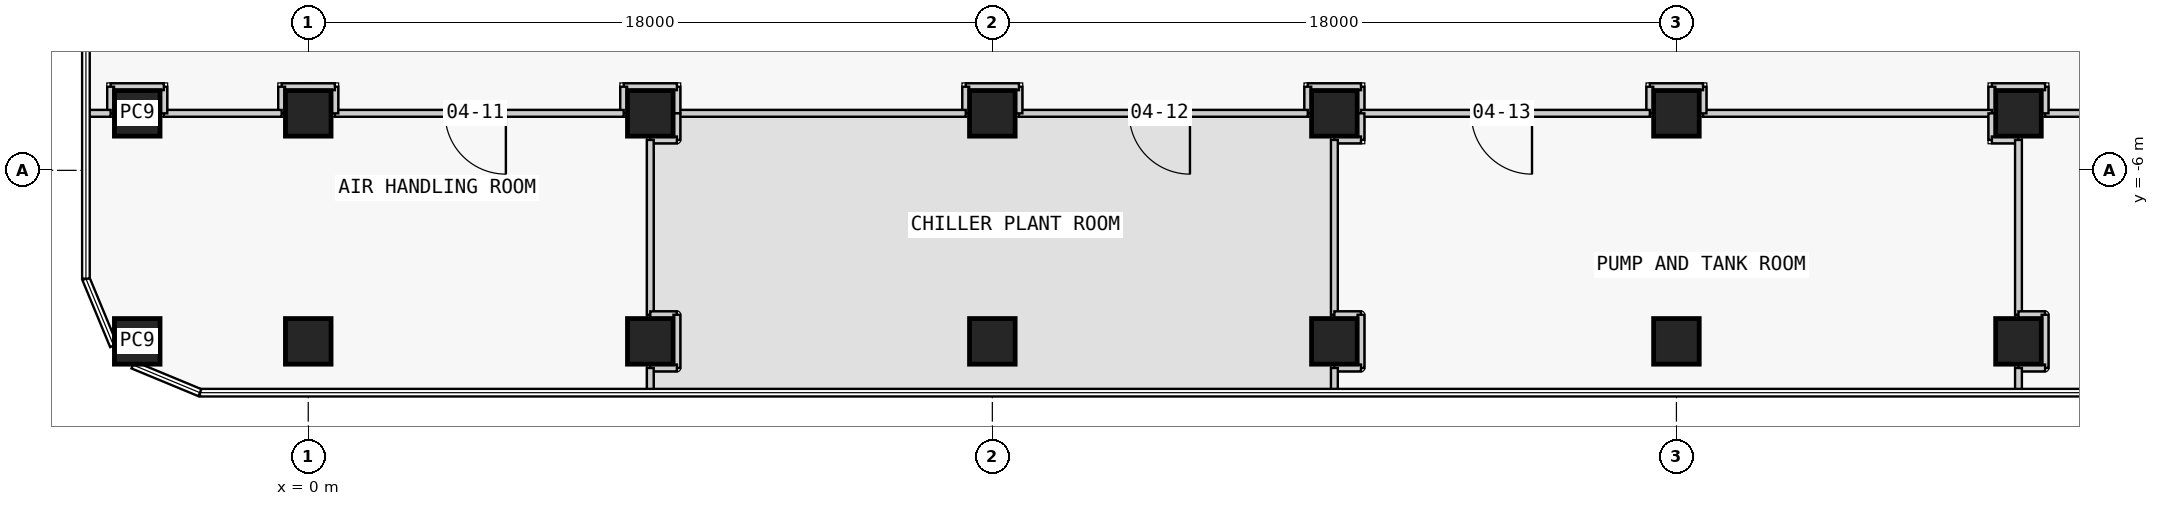
"""IFC4 building model, lengths in metres.
Left out: names, types, materials, properties, quantities, classifications, styles, units other than length and angle.
Written with IfcOpenShell. Run it as: python <this file> out.ifc"""

import sys

from ifc_helpers import new_model, si_unit, direction, frame, frame_2d, origin, origin_2d, place, context, subcontext, project, spatial, rectangle, extrude, element, fill, save


model = new_model("IFC4")
c1 = context("Model", 3, precision=1e-05, world=origin(), true_north=direction((0.0, 1.0)))
c2 = subcontext(c1, "Body", "Model", "MODEL_VIEW")
j1 = project(units=[si_unit("LENGTHUNIT", "METRE"), si_unit("PLANEANGLEUNIT", "RADIAN")], contexts=[c1])
p1 = place(None, origin())
s1 = spatial("IfcSite", under=j1, at=p1, CompositionType="ELEMENT")
p2 = place(p1, origin())
s2 = spatial("IfcBuilding", under=s1, at=p2, CompositionType="ELEMENT")
p3 = place(p2, frame((0.0, 0.0, 21.8)))
s3 = spatial("IfcBuildingStorey", under=s2, at=p3, CompositionType="ELEMENT", Elevation=21.8)
for number, where, z_axis, x_axis in (
    (1, (-4.5, -10.5, 0.0), (0.0, 0.0, 1.0), (1.0, 0.0, 0.0)),
    (2, (-4.5, -4.5, 0.0), (0.0, 0.0, 1.0), (1.0, 0.0, 0.0)),
    (3, (0.0, -10.5, 0.0), (0.0, 0.0, 1.0), (1.0, 0.0, 0.0)),
    (4, (0.0, -4.5, 0.0), (0.0, 0.0, 1.0), (1.0, 0.0, 0.0)),
    (5, (9.0, -10.5, 0.0), (0.0, 0.0, 1.0), (1.0, 0.0, 0.0)),
    (6, (9.0, -4.5, 0.0), (0.0, 0.0, 1.0), (1.0, 0.0, 0.0)),
    (7, (18.0, -10.5, 0.0), (0.0, 0.0, 1.0), (1.0, 0.0, 0.0)),
    (8, (18.0, -4.5, 0.0), (0.0, 0.0, 1.0), (1.0, 0.0, 0.0)),
    (9, (27.0, -10.5, 0.0), (0.0, 0.0, 1.0), (1.0, 0.0, 0.0)),
    (10, (27.0, -4.5, 0.0), (0.0, 0.0, 1.0), (1.0, 0.0, 0.0)),
    (11, (36.0, -10.5, 0.0), (0.0, 0.0, 1.0), (1.0, 0.0, 0.0)),
    (12, (36.0, -4.5, 0.0), (0.0, 0.0, 1.0), (1.0, 0.0, 0.0)),
    (13, (45.0, -10.5, 0.0), (0.0, 0.0, 1.0), (1.0, 0.0, 0.0)),
    (14, (45.0, -4.5, 0.0), (0.0, 0.0, 1.0), (1.0, 0.0, 0.0)),
):
    element("IfcColumn", number, at=place(p3, frame(where, z_axis=z_axis, x_axis=x_axis)), inside=s3, PredefinedType="COLUMN", context=c2, shape_type="SweptSolid", body=[
        extrude(rectangle(XDim=1.2, YDim=1.2, at=origin_2d()), origin(), (0.0, 0.0, 1.0), 5.0),
    ])
p4 = place(p3, frame((53.3, -4.5, 0.0), z_axis=(0.0, 0.0, 1.0), x_axis=(-1.0, 0.0, 0.0)))
e15 = element("IfcWall", 15, at=p4, inside=s3, PredefinedType="PARTITIONING", context=c2, shape_type="SweptSolid", body=[
    extrude(rectangle(XDim=7.6, YDim=0.18, at=frame_2d((3.8, 0.0))), origin(), (0.0, 0.0, 1.0), 4.5),
])
p5 = place(p3, frame((45.7, -4.5, 0.0), z_axis=(0.0, 0.0, 1.0), x_axis=(0.0, 1.0, 0.0)))
e16 = element("IfcWall", 16, at=p5, inside=s3, PredefinedType="PARTITIONING", context=c2, shape_type="SweptSolid", body=[
    extrude(rectangle(XDim=0.7, YDim=0.18, at=frame_2d((0.35, 0.0))), origin(), (0.0, 0.0, 1.0), 4.5),
])
p6 = place(p3, frame((45.7, -3.8, 0.0), z_axis=(0.0, 0.0, 1.0), x_axis=(-1.0, 0.0, 0.0)))
e17 = element("IfcWall", 17, at=p6, inside=s3, PredefinedType="PARTITIONING", context=c2, shape_type="SweptSolid", body=[
    extrude(rectangle(XDim=1.4, YDim=0.18, at=frame_2d((0.7, 0.0))), origin(), (0.0, 0.0, 1.0), 4.5),
])
for number, where, z_axis, x_axis in (
    (18, (44.3, -3.8, 0.0), (0.0, 0.0, 1.0), (0.0, -1.0, 0.0)),
    (19, (27.7, -4.5, 0.0), (0.0, 0.0, 1.0), (0.0, 1.0, 0.0)),
):
    element("IfcWall", number, at=place(p3, frame(where, z_axis=z_axis, x_axis=x_axis)), inside=s3, PredefinedType="PARTITIONING", context=c2, shape_type="SweptSolid", body=[
        extrude(rectangle(XDim=0.7, YDim=0.18, at=frame_2d((0.35, 0.0))), origin(), (0.0, 0.0, 1.0), 4.5),
    ])
p7 = place(p3, frame((27.7, -3.8, 0.0), z_axis=(0.0, 0.0, 1.0), x_axis=(-1.0, 0.0, 0.0)))
e20 = element("IfcWall", 20, at=p7, inside=s3, PredefinedType="PARTITIONING", context=c2, shape_type="SweptSolid", body=[
    extrude(rectangle(XDim=1.4, YDim=0.18, at=frame_2d((0.7, 0.0))), origin(), (0.0, 0.0, 1.0), 4.5),
])
p8 = place(p3, frame((26.3, -3.8, 0.0), z_axis=(0.0, 0.0, 1.0), x_axis=(0.0, -1.0, 0.0)))
e21 = element("IfcWall", 21, at=p8, inside=s3, PredefinedType="PARTITIONING", context=c2, shape_type="SweptSolid", body=[
    extrude(rectangle(XDim=0.7, YDim=0.18, at=frame_2d((0.35, 0.0))), origin(), (0.0, 0.0, 1.0), 4.5),
])
p9 = place(p3, frame((26.3, -4.5, 0.0), z_axis=(0.0, 0.0, 1.0), x_axis=(-1.0, 0.0, 0.0)))
e22 = element("IfcWall", 22, at=p9, inside=s3, PredefinedType="PARTITIONING", context=c2, shape_type="SweptSolid", body=[
    extrude(rectangle(XDim=7.6, YDim=0.18, at=frame_2d((3.8, 0.0))), origin(), (0.0, 0.0, 1.0), 4.5),
])
p10 = place(p9, frame((3.1, 0.0, 0.0)))
e23 = element("IfcOpeningElement", 23, at=p10, cuts=e22, PredefinedType="OPENING", context=c2, shape_type="SweptSolid", body=[
    extrude(rectangle(XDim=1.6, YDim=2.4, at=frame_2d((0.8, 1.2))), frame((0.0, 0.1, 0.0), z_axis=(0.0, -1.0, 0.0), x_axis=(1.0, 0.0, 0.0)), (0.0, 0.0, 1.0), 0.2),
])
p11 = place(p3, frame((18.7, -4.5, 0.0), z_axis=(0.0, 0.0, 1.0), x_axis=(0.0, 1.0, 0.0)))
e24 = element("IfcWall", 24, at=p11, inside=s3, PredefinedType="PARTITIONING", context=c2, shape_type="SweptSolid", body=[
    extrude(rectangle(XDim=0.7, YDim=0.18, at=frame_2d((0.35, 0.0))), origin(), (0.0, 0.0, 1.0), 4.5),
])
p12 = place(p3, frame((18.7, -3.8, 0.0), z_axis=(0.0, 0.0, 1.0), x_axis=(-1.0, 0.0, 0.0)))
e25 = element("IfcWall", 25, at=p12, inside=s3, PredefinedType="PARTITIONING", context=c2, shape_type="SweptSolid", body=[
    extrude(rectangle(XDim=1.4, YDim=0.18, at=frame_2d((0.7, 0.0))), origin(), (0.0, 0.0, 1.0), 4.5),
])
p13 = place(p3, frame((17.3, -3.8, 0.0), z_axis=(0.0, 0.0, 1.0), x_axis=(0.0, -1.0, 0.0)))
e26 = element("IfcWall", 26, at=p13, inside=s3, PredefinedType="PARTITIONING", context=c2, shape_type="SweptSolid", body=[
    extrude(rectangle(XDim=0.7, YDim=0.18, at=frame_2d((0.35, 0.0))), origin(), (0.0, 0.0, 1.0), 4.5),
])
p14 = place(p3, frame((17.3, -4.5, 0.0), z_axis=(0.0, 0.0, 1.0), x_axis=(-1.0, 0.0, 0.0)))
e27 = element("IfcWall", 27, at=p14, inside=s3, PredefinedType="PARTITIONING", context=c2, shape_type="SweptSolid", body=[
    extrude(rectangle(XDim=7.6, YDim=0.18, at=frame_2d((3.8, 0.0))), origin(), (0.0, 0.0, 1.0), 4.5),
])
p15 = place(p3, frame((9.7, -4.5, 0.0), z_axis=(0.0, 0.0, 1.0), x_axis=(0.0, 1.0, 0.0)))
e28 = element("IfcWall", 28, at=p15, inside=s3, PredefinedType="PARTITIONING", context=c2, shape_type="SweptSolid", body=[
    extrude(rectangle(XDim=0.7, YDim=0.18, at=frame_2d((0.35, 0.0))), origin(), (0.0, 0.0, 1.0), 4.5),
])
p16 = place(p3, frame((9.7, -3.8, 0.0), z_axis=(0.0, 0.0, 1.0), x_axis=(-1.0, 0.0, 0.0)))
e29 = element("IfcWall", 29, at=p16, inside=s3, PredefinedType="PARTITIONING", context=c2, shape_type="SweptSolid", body=[
    extrude(rectangle(XDim=1.4, YDim=0.18, at=frame_2d((0.7, 0.0))), origin(), (0.0, 0.0, 1.0), 4.5),
])
p17 = place(p3, frame((8.3, -3.8, 0.0), z_axis=(0.0, 0.0, 1.0), x_axis=(0.0, -1.0, 0.0)))
e30 = element("IfcWall", 30, at=p17, inside=s3, PredefinedType="PARTITIONING", context=c2, shape_type="SweptSolid", body=[
    extrude(rectangle(XDim=0.7, YDim=0.18, at=frame_2d((0.35, 0.0))), origin(), (0.0, 0.0, 1.0), 4.5),
])
p18 = place(p3, frame((8.3, -4.5, 0.0), z_axis=(0.0, 0.0, 1.0), x_axis=(-1.0, 0.0, 0.0)))
e31 = element("IfcWall", 31, at=p18, inside=s3, PredefinedType="PARTITIONING", context=c2, shape_type="SweptSolid", body=[
    extrude(rectangle(XDim=7.6, YDim=0.18, at=frame_2d((3.8, 0.0))), origin(), (0.0, 0.0, 1.0), 4.5),
])
p19 = place(p18, frame((3.1, 0.0, 0.0)))
e32 = element("IfcOpeningElement", 32, at=p19, cuts=e31, PredefinedType="OPENING", context=c2, shape_type="SweptSolid", body=[
    extrude(rectangle(XDim=1.6, YDim=2.4, at=frame_2d((0.8, 1.2))), frame((0.0, 0.1, 0.0), z_axis=(0.0, -1.0, 0.0), x_axis=(1.0, 0.0, 0.0)), (0.0, 0.0, 1.0), 0.2),
])
p20 = place(p3, frame((0.7, -4.5, 0.0), z_axis=(0.0, 0.0, 1.0), x_axis=(0.0, 1.0, 0.0)))
e33 = element("IfcWall", 33, at=p20, inside=s3, PredefinedType="PARTITIONING", context=c2, shape_type="SweptSolid", body=[
    extrude(rectangle(XDim=0.7, YDim=0.18, at=frame_2d((0.35, 0.0))), origin(), (0.0, 0.0, 1.0), 4.5),
])
p21 = place(p3, frame((0.7, -3.8, 0.0), z_axis=(0.0, 0.0, 1.0), x_axis=(-1.0, 0.0, 0.0)))
e34 = element("IfcWall", 34, at=p21, inside=s3, PredefinedType="PARTITIONING", context=c2, shape_type="SweptSolid", body=[
    extrude(rectangle(XDim=1.4, YDim=0.18, at=frame_2d((0.7, 0.0))), origin(), (0.0, 0.0, 1.0), 4.5),
])
p22 = place(p3, frame((-0.7, -3.8, 0.0), z_axis=(0.0, 0.0, 1.0), x_axis=(0.0, -1.0, 0.0)))
e35 = element("IfcWall", 35, at=p22, inside=s3, PredefinedType="PARTITIONING", context=c2, shape_type="SweptSolid", body=[
    extrude(rectangle(XDim=0.7, YDim=0.18, at=frame_2d((0.35, 0.0))), origin(), (0.0, 0.0, 1.0), 4.5),
])
p23 = place(p3, frame((-0.7, -4.5, 0.0), z_axis=(0.0, 0.0, 1.0), x_axis=(-1.0, 0.0, 0.0)))
e36 = element("IfcWall", 36, at=p23, inside=s3, PredefinedType="PARTITIONING", context=c2, shape_type="SweptSolid", body=[
    extrude(rectangle(XDim=3.1, YDim=0.18, at=frame_2d((1.55, 0.0))), origin(), (0.0, 0.0, 1.0), 4.5),
])
p24 = place(p3, frame((-3.8, -4.5, 0.0), z_axis=(0.0, 0.0, 1.0), x_axis=(0.0, 1.0, 0.0)))
e37 = element("IfcWall", 37, at=p24, inside=s3, PredefinedType="PARTITIONING", context=c2, shape_type="SweptSolid", body=[
    extrude(rectangle(XDim=0.7, YDim=0.18, at=frame_2d((0.35, 0.0))), origin(), (0.0, 0.0, 1.0), 4.5),
])
p25 = place(p3, frame((-3.8, -3.8, 0.0), z_axis=(0.0, 0.0, 1.0), x_axis=(-1.0, 0.0, 0.0)))
e38 = element("IfcWall", 38, at=p25, inside=s3, PredefinedType="PARTITIONING", context=c2, shape_type="SweptSolid", body=[
    extrude(rectangle(XDim=1.4, YDim=0.18, at=frame_2d((0.7, 0.0))), origin(), (0.0, 0.0, 1.0), 4.5),
])
p26 = place(p3, frame((-5.2, -3.8, 0.0), z_axis=(0.0, 0.0, 1.0), x_axis=(0.0, -1.0, 0.0)))
e39 = element("IfcWall", 39, at=p26, inside=s3, PredefinedType="PARTITIONING", context=c2, shape_type="SweptSolid", body=[
    extrude(rectangle(XDim=0.7, YDim=0.18, at=frame_2d((0.35, 0.0))), origin(), (0.0, 0.0, 1.0), 4.5),
])
p27 = place(p3, frame((-5.2, -4.5, 0.0), z_axis=(0.0, 0.0, 1.0), x_axis=(-1.0, 0.0, 0.0)))
e40 = element("IfcWall", 40, at=p27, inside=s3, PredefinedType="PARTITIONING", context=c2, shape_type="SweptSolid", body=[
    extrude(rectangle(XDim=0.65, YDim=0.18, at=frame_2d((0.325, 0.0))), origin(), (0.0, 0.0, 1.0), 4.5),
])
p28 = place(p3, frame((44.3, -4.5, 0.0), z_axis=(0.0, 0.0, 1.0), x_axis=(-1.0, 0.0, 0.0)))
e41 = element("IfcWall", 41, at=p28, inside=s3, PredefinedType="PARTITIONING", context=c2, shape_type="SweptSolid", body=[
    extrude(rectangle(XDim=7.6, YDim=0.18, at=frame_2d((3.8, 0.0))), origin(), (0.0, 0.0, 1.0), 4.5),
])
p29 = place(p3, frame((36.7, -4.5, 0.0), z_axis=(0.0, 0.0, 1.0), x_axis=(0.0, 1.0, 0.0)))
e42 = element("IfcWall", 42, at=p29, inside=s3, PredefinedType="PARTITIONING", context=c2, shape_type="SweptSolid", body=[
    extrude(rectangle(XDim=0.7, YDim=0.18, at=frame_2d((0.35, 0.0))), origin(), (0.0, 0.0, 1.0), 4.5),
])
p30 = place(p3, frame((36.7, -3.8, 0.0), z_axis=(0.0, 0.0, 1.0), x_axis=(-1.0, 0.0, 0.0)))
e43 = element("IfcWall", 43, at=p30, inside=s3, PredefinedType="PARTITIONING", context=c2, shape_type="SweptSolid", body=[
    extrude(rectangle(XDim=1.4, YDim=0.18, at=frame_2d((0.7, 0.0))), origin(), (0.0, 0.0, 1.0), 4.5),
])
p31 = place(p3, frame((35.3, -3.8, 0.0), z_axis=(0.0, 0.0, 1.0), x_axis=(0.0, -1.0, 0.0)))
e44 = element("IfcWall", 44, at=p31, inside=s3, PredefinedType="PARTITIONING", context=c2, shape_type="SweptSolid", body=[
    extrude(rectangle(XDim=0.7, YDim=0.18, at=frame_2d((0.35, 0.0))), origin(), (0.0, 0.0, 1.0), 4.5),
])
p32 = place(p3, frame((35.3, -4.5, 0.0), z_axis=(0.0, 0.0, 1.0), x_axis=(-1.0, 0.0, 0.0)))
e45 = element("IfcWall", 45, at=p32, inside=s3, PredefinedType="PARTITIONING", context=c2, shape_type="SweptSolid", body=[
    extrude(rectangle(XDim=7.6, YDim=0.18, at=frame_2d((3.8, 0.0))), origin(), (0.0, 0.0, 1.0), 4.5),
])
p33 = place(p32, frame((3.1, 0.0, 0.0)))
e46 = element("IfcOpeningElement", 46, at=p33, cuts=e45, PredefinedType="OPENING", context=c2, shape_type="SweptSolid", body=[
    extrude(rectangle(XDim=1.6, YDim=2.4, at=frame_2d((0.8, 1.2))), frame((0.0, 0.1, 0.0), z_axis=(0.0, -1.0, 0.0), x_axis=(1.0, 0.0, 0.0)), (0.0, 0.0, 1.0), 0.2),
])
for number, where, z_axis, x_axis in (
    (47, (44.3, -4.5, 0.0), (0.0, 0.0, 1.0), (0.0, -1.0, 0.0)),
    (48, (44.3, -5.2, 0.0), (0.0, 0.0, 1.0), (1.0, 0.0, 0.0)),
):
    element("IfcWall", number, at=place(p3, frame(where, z_axis=z_axis, x_axis=x_axis)), inside=s3, PredefinedType="PARTITIONING", context=c2, shape_type="SweptSolid", body=[
        extrude(rectangle(XDim=0.7, YDim=0.18, at=frame_2d((0.35, 0.0))), origin(), (0.0, 0.0, 1.0), 4.5),
    ])
p34 = place(p3, frame((45.0, -5.2, 0.0), z_axis=(0.0, 0.0, 1.0), x_axis=(0.0, -1.0, 0.0)))
e49 = element("IfcWall", 49, at=p34, inside=s3, PredefinedType="PARTITIONING", context=c2, shape_type="SweptSolid", body=[
    extrude(rectangle(XDim=4.6, YDim=0.18, at=frame_2d((2.3, 0.0))), origin(), (0.0, 0.0, 1.0), 4.5),
])
p35 = place(p3, frame((45.0, -9.8, 0.0), z_axis=(0.0, 0.0, 1.0), x_axis=(1.0, 0.0, 0.0)))
e50 = element("IfcWall", 50, at=p35, inside=s3, PredefinedType="PARTITIONING", context=c2, shape_type="SweptSolid", body=[
    extrude(rectangle(XDim=0.7, YDim=0.18, at=frame_2d((0.35, 0.0))), origin(), (0.0, 0.0, 1.0), 4.5),
])
p36 = place(p3, frame((45.7, -9.8, 0.0), z_axis=(0.0, 0.0, 1.0), x_axis=(0.0, -1.0, 0.0)))
e51 = element("IfcWall", 51, at=p36, inside=s3, PredefinedType="PARTITIONING", context=c2, shape_type="SweptSolid", body=[
    extrude(rectangle(XDim=1.4, YDim=0.18, at=frame_2d((0.7, 0.0))), origin(), (0.0, 0.0, 1.0), 4.5),
])
p37 = place(p3, frame((45.7, -11.2, 0.0), z_axis=(0.0, 0.0, 1.0), x_axis=(-1.0, 0.0, 0.0)))
e52 = element("IfcWall", 52, at=p37, inside=s3, PredefinedType="PARTITIONING", context=c2, shape_type="SweptSolid", body=[
    extrude(rectangle(XDim=0.7, YDim=0.18, at=frame_2d((0.35, 0.0))), origin(), (0.0, 0.0, 1.0), 4.5),
])
p38 = place(p3, frame((45.0, -11.2, 0.0), z_axis=(0.0, 0.0, 1.0), x_axis=(0.0, -1.0, 0.0)))
e53 = element("IfcWall", 53, at=p38, inside=s3, PredefinedType="PARTITIONING", context=c2, shape_type="SweptSolid", body=[
    extrude(rectangle(XDim=0.65, YDim=0.18, at=frame_2d((0.325, 0.0))), origin(), (0.0, 0.0, 1.0), 4.5),
])
for number, where, z_axis, x_axis in (
    (54, (27.7, -4.5, 0.0), (0.0, 0.0, 1.0), (0.0, -1.0, 0.0)),
    (55, (27.7, -5.2, 0.0), (0.0, 0.0, 1.0), (-1.0, 0.0, 0.0)),
):
    element("IfcWall", number, at=place(p3, frame(where, z_axis=z_axis, x_axis=x_axis)), inside=s3, PredefinedType="PARTITIONING", context=c2, shape_type="SweptSolid", body=[
        extrude(rectangle(XDim=0.7, YDim=0.18, at=frame_2d((0.35, 0.0))), origin(), (0.0, 0.0, 1.0), 4.5),
    ])
p39 = place(p3, frame((27.0, -5.2, 0.0), z_axis=(0.0, 0.0, 1.0), x_axis=(0.0, -1.0, 0.0)))
e56 = element("IfcWall", 56, at=p39, inside=s3, PredefinedType="PARTITIONING", context=c2, shape_type="SweptSolid", body=[
    extrude(rectangle(XDim=4.6, YDim=0.18, at=frame_2d((2.3, 0.0))), origin(), (0.0, 0.0, 1.0), 4.5),
])
p40 = place(p3, frame((27.0, -9.8, 0.0), z_axis=(0.0, 0.0, 1.0), x_axis=(1.0, 0.0, 0.0)))
e57 = element("IfcWall", 57, at=p40, inside=s3, PredefinedType="PARTITIONING", context=c2, shape_type="SweptSolid", body=[
    extrude(rectangle(XDim=0.7, YDim=0.18, at=frame_2d((0.35, 0.0))), origin(), (0.0, 0.0, 1.0), 4.5),
])
p41 = place(p3, frame((27.7, -9.8, 0.0), z_axis=(0.0, 0.0, 1.0), x_axis=(0.0, -1.0, 0.0)))
e58 = element("IfcWall", 58, at=p41, inside=s3, PredefinedType="PARTITIONING", context=c2, shape_type="SweptSolid", body=[
    extrude(rectangle(XDim=1.4, YDim=0.18, at=frame_2d((0.7, 0.0))), origin(), (0.0, 0.0, 1.0), 4.5),
])
p42 = place(p3, frame((27.7, -11.2, 0.0), z_axis=(0.0, 0.0, 1.0), x_axis=(-1.0, 0.0, 0.0)))
e59 = element("IfcWall", 59, at=p42, inside=s3, PredefinedType="PARTITIONING", context=c2, shape_type="SweptSolid", body=[
    extrude(rectangle(XDim=0.7, YDim=0.18, at=frame_2d((0.35, 0.0))), origin(), (0.0, 0.0, 1.0), 4.5),
])
p43 = place(p3, frame((27.0, -11.2, 0.0), z_axis=(0.0, 0.0, 1.0), x_axis=(0.0, -1.0, 0.0)))
e60 = element("IfcWall", 60, at=p43, inside=s3, PredefinedType="PARTITIONING", context=c2, shape_type="SweptSolid", body=[
    extrude(rectangle(XDim=0.65, YDim=0.18, at=frame_2d((0.325, 0.0))), origin(), (0.0, 0.0, 1.0), 4.5),
])
for number, where, z_axis, x_axis in (
    (61, (9.7, -4.5, 0.0), (0.0, 0.0, 1.0), (0.0, -1.0, 0.0)),
    (62, (9.7, -5.2, 0.0), (0.0, 0.0, 1.0), (-1.0, 0.0, 0.0)),
):
    element("IfcWall", number, at=place(p3, frame(where, z_axis=z_axis, x_axis=x_axis)), inside=s3, PredefinedType="PARTITIONING", context=c2, shape_type="SweptSolid", body=[
        extrude(rectangle(XDim=0.7, YDim=0.18, at=frame_2d((0.35, 0.0))), origin(), (0.0, 0.0, 1.0), 4.5),
    ])
p44 = place(p3, frame((9.0, -5.2, 0.0), z_axis=(0.0, 0.0, 1.0), x_axis=(0.0, -1.0, 0.0)))
e63 = element("IfcWall", 63, at=p44, inside=s3, PredefinedType="PARTITIONING", context=c2, shape_type="SweptSolid", body=[
    extrude(rectangle(XDim=4.6, YDim=0.18, at=frame_2d((2.3, 0.0))), origin(), (0.0, 0.0, 1.0), 4.5),
])
p45 = place(p3, frame((9.0, -9.8, 0.0), z_axis=(0.0, 0.0, 1.0), x_axis=(1.0, 0.0, 0.0)))
e64 = element("IfcWall", 64, at=p45, inside=s3, PredefinedType="PARTITIONING", context=c2, shape_type="SweptSolid", body=[
    extrude(rectangle(XDim=0.7, YDim=0.18, at=frame_2d((0.35, 0.0))), origin(), (0.0, 0.0, 1.0), 4.5),
])
p46 = place(p3, frame((9.7, -9.8, 0.0), z_axis=(0.0, 0.0, 1.0), x_axis=(0.0, -1.0, 0.0)))
e65 = element("IfcWall", 65, at=p46, inside=s3, PredefinedType="PARTITIONING", context=c2, shape_type="SweptSolid", body=[
    extrude(rectangle(XDim=1.4, YDim=0.18, at=frame_2d((0.7, 0.0))), origin(), (0.0, 0.0, 1.0), 4.5),
])
p47 = place(p3, frame((9.7, -11.2, 0.0), z_axis=(0.0, 0.0, 1.0), x_axis=(-1.0, 0.0, 0.0)))
e66 = element("IfcWall", 66, at=p47, inside=s3, PredefinedType="PARTITIONING", context=c2, shape_type="SweptSolid", body=[
    extrude(rectangle(XDim=0.7, YDim=0.18, at=frame_2d((0.35, 0.0))), origin(), (0.0, 0.0, 1.0), 4.5),
])
p48 = place(p3, frame((9.0, -11.2, 0.0), z_axis=(0.0, 0.0, 1.0), x_axis=(0.0, -1.0, 0.0)))
e67 = element("IfcWall", 67, at=p48, inside=s3, PredefinedType="PARTITIONING", context=c2, shape_type="SweptSolid", body=[
    extrude(rectangle(XDim=0.65, YDim=0.18, at=frame_2d((0.325, 0.0))), origin(), (0.0, 0.0, 1.0), 4.5),
])
p49 = place(p19, origin())
e68 = element("IfcDoor", 68, at=p49, inside=s3, OperationType="SINGLE_SWING_LEFT", PredefinedType="DOOR", context=c2, shape_type="SweptSolid", body=[
    extrude(rectangle(XDim=1.6, YDim=2.4, at=frame_2d((0.8, 1.2))), frame((0.0, 0.025, 0.0), z_axis=(0.0, -1.0, 0.0), x_axis=(1.0, 0.0, 0.0)), (0.0, 0.0, 1.0), 0.05),
])
fill(e32, e68)
p50 = place(p10, origin())
e69 = element("IfcDoor", 69, at=p50, inside=s3, OperationType="SINGLE_SWING_LEFT", PredefinedType="DOOR", context=c2, shape_type="SweptSolid", body=[
    extrude(rectangle(XDim=1.6, YDim=2.4, at=frame_2d((0.8, 1.2))), frame((0.0, 0.025, 0.0), z_axis=(0.0, -1.0, 0.0), x_axis=(1.0, 0.0, 0.0)), (0.0, 0.0, 1.0), 0.05),
])
fill(e23, e69)
p51 = place(p33, origin())
e70 = element("IfcDoor", 70, at=p51, inside=s3, OperationType="SINGLE_SWING_LEFT", PredefinedType="DOOR", context=c2, shape_type="SweptSolid", body=[
    extrude(rectangle(XDim=1.6, YDim=2.4, at=frame_2d((0.8, 1.2))), frame((0.0, 0.025, 0.0), z_axis=(0.0, -1.0, 0.0), x_axis=(1.0, 0.0, 0.0)), (0.0, 0.0, 1.0), 0.05),
])
fill(e46, e70)
save(model, sys.argv[1])
